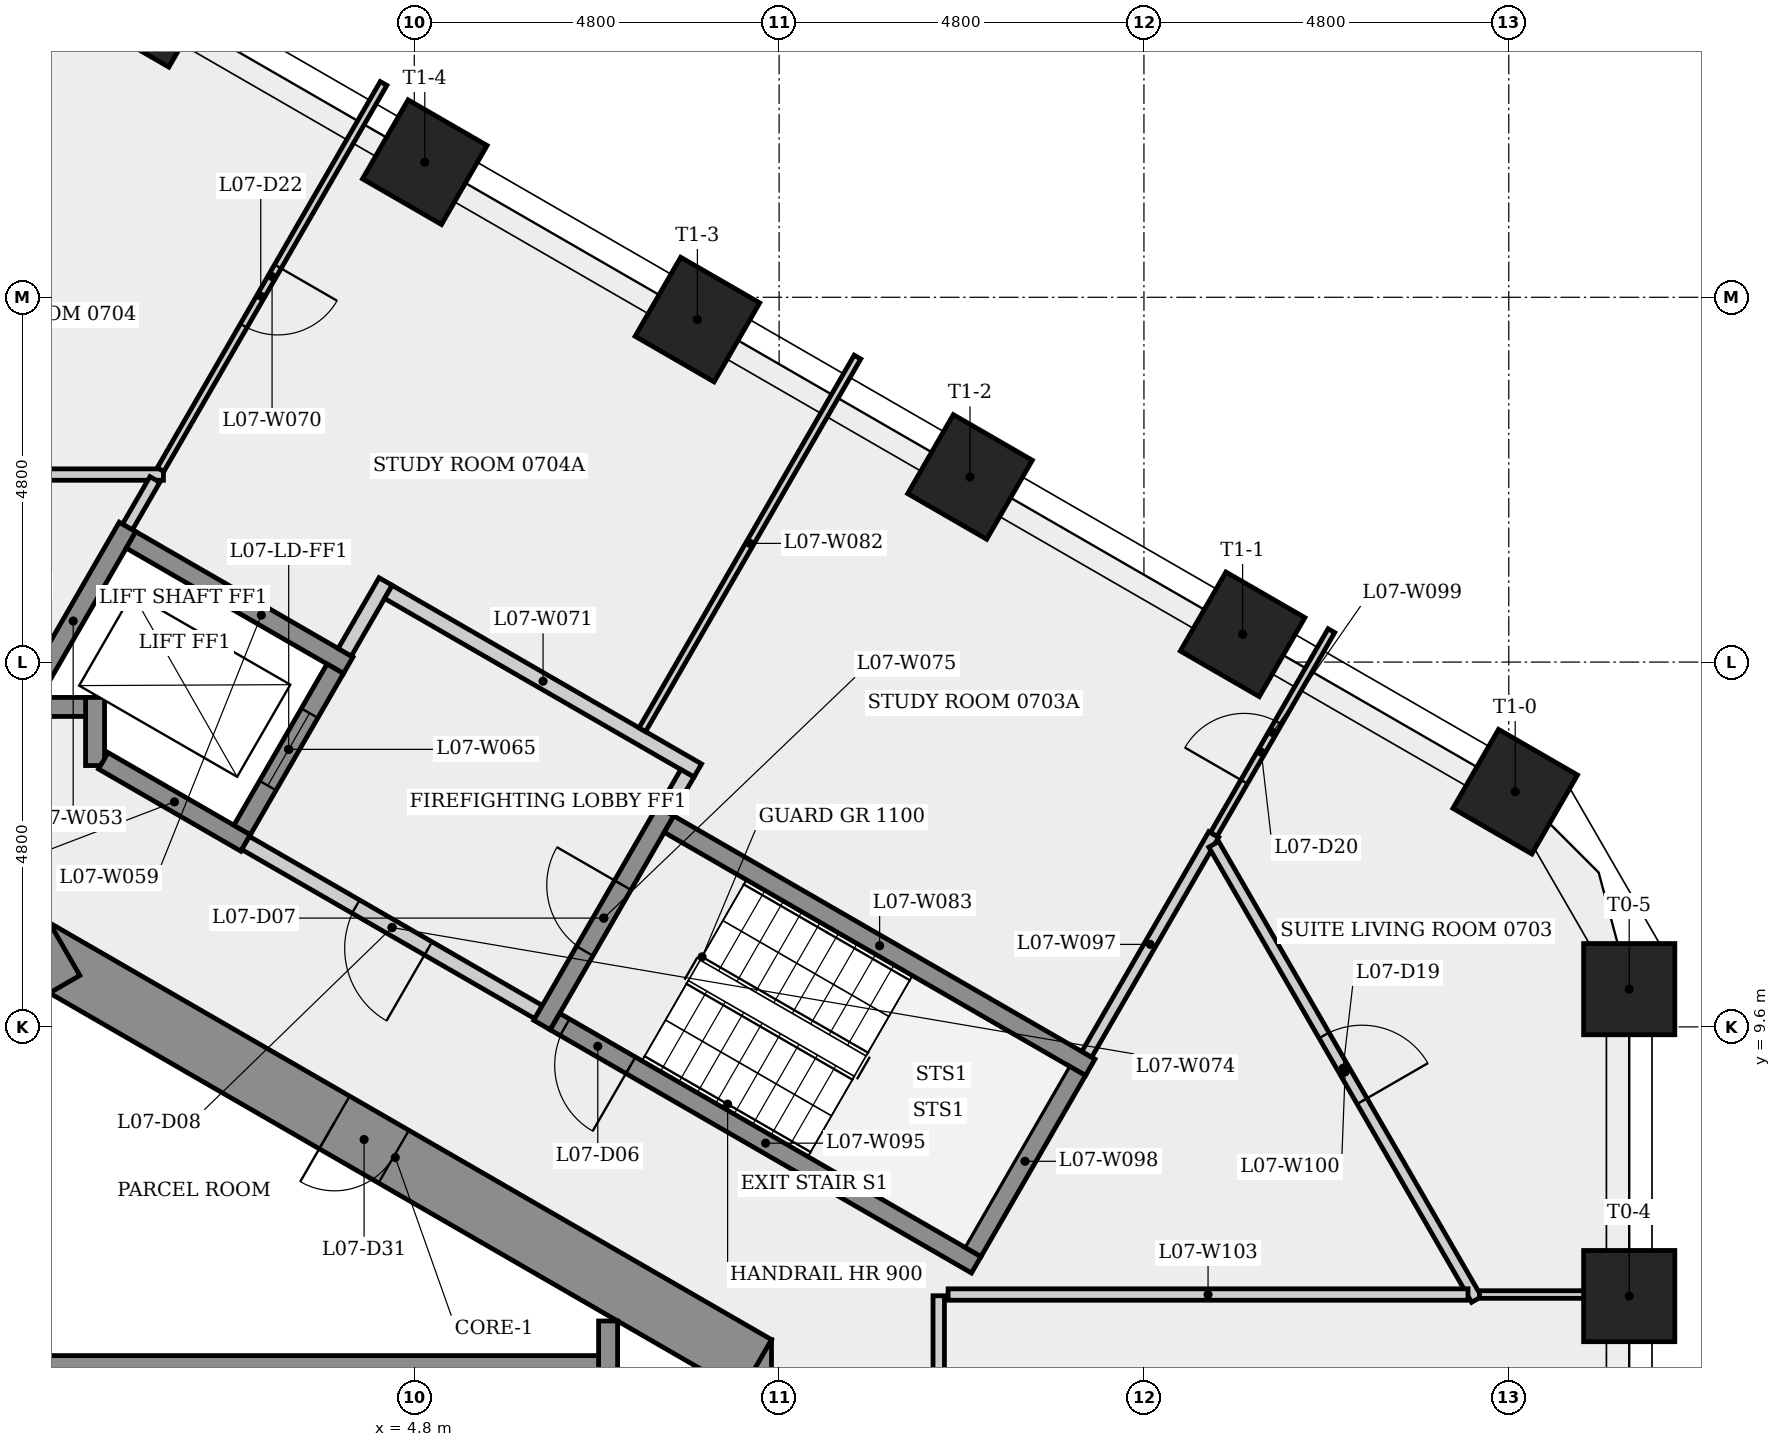
"""IFC4 building model, lengths in metres.
Left out: names, types, materials, properties, quantities, classifications, styles, units other than length and angle.
Written with IfcOpenShell. Run it as: python <this file> out.ifc"""

import sys

from ifc_helpers import new_model, si_unit, direction, frame, frame_2d, origin, origin_2d, place, context, subcontext, project, spatial, rectangle, extrude, element, fill, save


model = new_model("IFC4")
c1 = context("Model", 3, precision=1e-05, world=origin(), true_north=direction((0.0, 1.0)))
c2 = subcontext(c1, "Body", "Model", "MODEL_VIEW")
j1 = project(units=[si_unit("LENGTHUNIT", "METRE"), si_unit("PLANEANGLEUNIT", "RADIAN")], contexts=[c1])
p1 = place(None, origin())
s1 = spatial("IfcSite", under=j1, at=p1, CompositionType="ELEMENT")
p2 = place(p1, origin())
s2 = spatial("IfcBuilding", under=s1, at=p2, CompositionType="ELEMENT")
p3 = place(p2, frame((0.0, 0.0, 32.3)))
s3 = spatial("IfcBuildingStorey", under=s2, at=p3, CompositionType="ELEMENT", Elevation=32.3)
p4 = place(p3, frame((9.1, -5.485, 0.0), z_axis=(0.0, 0.0, 1.0), x_axis=(0.0, 1.0, 0.0)))
e1 = element("IfcWall", 1, at=p4, inside=s3, PredefinedType="SHEAR", context=c2, shape_type="SweptSolid", body=[
    extrude(rectangle(XDim=10.97, YDim=0.8, at=frame_2d((5.485, 0.0))), origin(), (0.0, 0.0, 1.0), 3.4),
])
p5 = place(p4, frame((4.685, 0.0, 0.0)))
e2 = element("IfcOpeningElement", 2, at=p5, cuts=e1, PredefinedType="OPENING", context=c2, shape_type="SweptSolid", body=[
    extrude(rectangle(XDim=1.6, YDim=2.1, at=frame_2d((0.8, 1.05))), frame((0.0, 0.41, 0.0), z_axis=(0.0, -1.0, 0.0), x_axis=(1.0, 0.0, 0.0)), (0.0, 0.0, 1.0), 0.82),
])
p6 = place(p3, frame((9.3, 5.138, 0.0), z_axis=(0.0, 0.0, 1.0), x_axis=(-0.866023993627, 0.500002442456, 0.0)))
e3 = element("IfcWall", 3, at=p6, inside=s3, PredefinedType="SHEAR", context=c2, shape_type="SweptSolid", body=[
    extrude(rectangle(XDim=10.97, YDim=0.8, at=frame_2d((5.485, 0.0))), origin(), (0.0, 0.0, 1.0), 3.4),
])
p7 = place(p6, frame((5.509, 0.0, 0.0)))
e4 = element("IfcOpeningElement", 4, at=p7, cuts=e3, PredefinedType="OPENING", context=c2, shape_type="SweptSolid", body=[
    extrude(rectangle(XDim=0.9, YDim=2.1, at=frame_2d((0.45, 1.05))), frame((0.0, 0.41, 0.0), z_axis=(0.0, -1.0, 0.0), x_axis=(1.0, 0.0, 0.0)), (0.0, 0.0, 1.0), 0.82),
])
p8 = place(p3, frame((0.2, 10.623, 0.0), z_axis=(0.0, 0.0, 1.0), x_axis=(-0.866023993627, -0.500002442456, 0.0)))
e5 = element("IfcWall", 5, at=p8, inside=s3, PredefinedType="SHEAR", context=c2, shape_type="SweptSolid", body=[
    extrude(rectangle(XDim=10.97, YDim=0.8, at=frame_2d((5.485, 0.0))), origin(), (0.0, 0.0, 1.0), 3.4),
])
p9 = place(p8, frame((6.993, 0.0, 0.0)))
e6 = element("IfcOpeningElement", 6, at=p9, cuts=e5, PredefinedType="OPENING", context=c2, shape_type="SweptSolid", body=[
    extrude(rectangle(XDim=0.9, YDim=2.1, at=frame_2d((0.45, 1.05))), frame((0.0, 0.41, 0.0), z_axis=(0.0, -1.0, 0.0), x_axis=(1.0, 0.0, 0.0)), (0.0, 0.0, 1.0), 0.82),
])
for number, where, z_axis, x_axis in (
    (7, (20.785, 6.058, 0.0), (0.0, 0.0, 1.0), (1.0, 0.0, 0.0)),
    (8, (20.785, 10.097, 0.0), (0.0, 0.0, 1.0), (1.0, 0.0, 0.0)),
    (9, (19.285, 12.695, 0.0), (0.0, 0.0, 1.0), (0.5, 0.866, 0.0)),
    (10, (15.698, 14.765, 0.0), (0.0, 0.0, 1.0), (0.5, 0.866, 0.0)),
    (11, (12.111, 16.836, 0.0), (0.0, 0.0, 1.0), (0.5, 0.866, 0.0)),
    (12, (8.525, 18.907, 0.0), (0.0, 0.0, 1.0), (0.5, 0.866, 0.0)),
    (13, (4.938, 20.978, 0.0), (0.0, 0.0, 1.0), (0.5, 0.866, 0.0)),
    (14, (1.352, 23.048, 0.0), (0.0, 0.0, 1.0), (0.5, 0.866, 0.0)),
):
    element("IfcColumn", number, at=place(p3, frame(where, z_axis=z_axis, x_axis=x_axis)), inside=s3, PredefinedType="COLUMN", context=c2, shape_type="SweptSolid", body=[
        extrude(rectangle(XDim=1.2, YDim=1.2, at=origin_2d()), origin(), (0.0, 0.0, 1.0), 3.4),
    ])
p10 = place(p3, frame((-7.225, 5.15, 0.0), z_axis=(0.0, 0.0, 1.0), x_axis=(1.0, 0.0, 0.0)))
e15 = element("IfcWall", 15, at=p10, inside=s3, PredefinedType="SHEAR", context=c2, shape_type="SweptSolid", body=[
    extrude(rectangle(XDim=14.7, YDim=0.25, at=frame_2d((7.35, 0.0))), origin(), (0.0, 0.0, 1.0), 3.05),
])
p11 = place(p3, frame((-2.794, 16.867, 0.0), z_axis=(0.0, 0.0, 1.0), x_axis=(1.0, 0.0, 0.0)))
e16 = element("IfcWall", 16, at=p11, inside=s3, PredefinedType="PARTITIONING", context=c2, shape_type="SweptSolid", body=[
    extrude(rectangle(XDim=4.294, YDim=0.15, at=frame_2d((2.147, 0.0))), origin(), (0.0, 0.0, 1.0), 3.05),
])
p12 = place(p11, frame((1.647, 0.0, 0.0)))
e17 = element("IfcOpeningElement", 17, at=p12, cuts=e16, PredefinedType="OPENING", context=c2, shape_type="SweptSolid", body=[
    extrude(rectangle(XDim=1.0, YDim=2.1, at=frame_2d((0.5, 1.05))), frame((0.0, 0.085, 0.0), z_axis=(0.0, -1.0, 0.0), x_axis=(1.0, 0.0, 0.0)), (0.0, 0.0, 1.0), 0.17),
])
p13 = place(p3, frame((-0.403, 13.702, 0.0), z_axis=(0.0, 0.0, 1.0), x_axis=(0.499976111731, 0.866039195244, 0.0)))
e18 = element("IfcWall", 18, at=p13, inside=s3, PredefinedType="SHEAR", context=c2, shape_type="SweptSolid", body=[
    extrude(rectangle(XDim=2.861, YDim=0.25, at=frame_2d((1.43, 0.0))), origin(), (0.0, 0.0, 1.0), 3.05),
])
p14 = place(p3, frame((0.6, 13.039, 0.0), z_axis=(0.0, 0.0, 1.0), x_axis=(0.0, 1.0, 0.0)))
e19 = element("IfcWall", 19, at=p14, inside=s3, PredefinedType="SHEAR", context=c2, shape_type="SweptSolid", body=[
    extrude(rectangle(XDim=0.896, YDim=0.25, at=frame_2d((0.448, 0.0))), origin(), (0.0, 0.0, 1.0), 3.05),
])
p15 = place(p3, frame((0.475, 13.81, 0.0), z_axis=(0.0, 0.0, 1.0), x_axis=(-1.0, 0.0, 0.0)))
e20 = element("IfcWall", 20, at=p15, inside=s3, PredefinedType="SHEAR", context=c2, shape_type="SweptSolid", body=[
    extrude(rectangle(XDim=0.691, YDim=0.25, at=frame_2d((0.345, 0.0))), origin(), (0.0, 0.0, 1.0), 3.4),
])
p16 = place(p3, frame((1.073, 16.008, 0.0), z_axis=(0.0, 0.0, 1.0), x_axis=(0.866040211805, -0.499974350878, 0.0)))
e21 = element("IfcWall", 21, at=p16, inside=s3, PredefinedType="SHEAR", context=c2, shape_type="SweptSolid", body=[
    extrude(rectangle(XDim=3.3, YDim=0.25, at=frame_2d((1.65, 0.0))), origin(), (0.0, 0.0, 1.0), 3.05),
])
p17 = place(p3, frame((1.387, 16.802, 0.0), z_axis=(0.0, 0.0, 1.0), x_axis=(-0.499859449273, -0.866106535579, 0.0)))
e22 = element("IfcWall", 22, at=p17, inside=s3, PredefinedType="PARTITIONING", context=c2, shape_type="SweptSolid", body=[
    extrude(rectangle(XDim=0.72, YDim=0.15, at=frame_2d((0.36, 0.0))), origin(), (0.0, 0.0, 1.0), 3.05),
])
p18 = place(p3, frame((2.581, 12.02, 0.0), z_axis=(0.0, 0.0, 1.0), x_axis=(-0.86603892542, 0.499976579108, 0.0)))
e23 = element("IfcWall", 23, at=p18, inside=s3, PredefinedType="SHEAR", context=c2, shape_type="SweptSolid", body=[
    extrude(rectangle(XDim=2.162, YDim=0.25, at=frame_2d((1.081, 0.0))), origin(), (0.0, 0.0, 1.0), 3.05),
])
p19 = place(p3, frame((2.535, 12.191, 0.0), z_axis=(0.0, 0.0, 1.0), x_axis=(0.500061746146, 0.865989751695, 0.0)))
e24 = element("IfcWall", 24, at=p19, inside=s3, PredefinedType="SHEAR", context=c2, shape_type="SweptSolid", body=[
    extrude(rectangle(XDim=2.45, YDim=0.25, at=frame_2d((1.225, 0.0))), origin(), (0.0, 0.0, 1.0), 3.4),
])
p20 = place(p19, frame((0.675, 0.0, 0.0)))
e25 = element("IfcOpeningElement", 25, at=p20, cuts=e24, PredefinedType="OPENING", context=c2, shape_type="SweptSolid", body=[
    extrude(rectangle(XDim=1.1, YDim=2.1, at=frame_2d((0.55, 1.05))), frame((0.0, 0.135, 0.0), z_axis=(0.0, -1.0, 0.0), x_axis=(1.0, 0.0, 0.0)), (0.0, 0.0, 1.0), 0.27),
])
p21 = place(p3, frame((3.885, 14.529, 0.0), z_axis=(0.0, 0.0, 1.0), x_axis=(0.499997628298, 0.866026773083, 0.0)))
e26 = element("IfcWall", 26, at=p21, inside=s3, PredefinedType="PARTITIONING", context=c2, shape_type="SweptSolid", body=[
    extrude(rectangle(XDim=1.075, YDim=0.2, at=frame_2d((0.538, 0.0))), origin(), (0.0, 0.0, 1.0), 3.05),
])
p22 = place(p3, frame((4.396, 22.013, 0.0), z_axis=(0.0, 0.0, 1.0), x_axis=(-0.500005810984, -0.866022048785, 0.0)))
e27 = element("IfcWall", 27, at=p22, inside=s3, PredefinedType="PARTITIONING", context=c2, shape_type="SweptSolid", body=[
    extrude(rectangle(XDim=5.867, YDim=0.1, at=frame_2d((2.934, 0.0))), origin(), (0.0, 0.0, 1.0), 3.05),
])
p23 = place(p22, frame((2.781, 0.0, 0.0)))
e28 = element("IfcOpeningElement", 28, at=p23, cuts=e27, PredefinedType="OPENING", context=c2, shape_type="SweptSolid", body=[
    extrude(rectangle(XDim=0.9, YDim=2.1, at=frame_2d((0.45, 1.05))), frame((0.0, 0.06, 0.0), z_axis=(0.0, -1.0, 0.0), x_axis=(1.0, 0.0, 0.0)), (0.0, 0.0, 1.0), 0.12),
])
p24 = place(p3, frame((4.459, 15.323, 0.0), z_axis=(0.0, 0.0, 1.0), x_axis=(0.866016039709, -0.500016218704, 0.0)))
e29 = element("IfcWall", 29, at=p24, inside=s3, PredefinedType="PARTITIONING", context=c2, shape_type="SweptSolid", body=[
    extrude(rectangle(XDim=4.7, YDim=0.2, at=frame_2d((2.35, 0.0))), origin(), (0.0, 0.0, 1.0), 3.05),
])
p25 = place(p3, frame((6.435, 9.795, 0.0), z_axis=(0.0, 0.0, 1.0), x_axis=(-0.866012907634, 0.500021643343, 0.0)))
e30 = element("IfcWall", 30, at=p25, inside=s3, PredefinedType="PARTITIONING", context=c2, shape_type="SweptSolid", body=[
    extrude(rectangle(XDim=4.45, YDim=0.2, at=frame_2d((2.225, 0.0))), origin(), (0.0, 0.0, 1.0), 3.05),
])
p26 = place(p25, frame((1.675, 0.0, 0.0)))
e31 = element("IfcOpeningElement", 31, at=p26, cuts=e30, PredefinedType="OPENING", context=c2, shape_type="SweptSolid", body=[
    extrude(rectangle(XDim=1.1, YDim=2.1, at=frame_2d((0.55, 1.05))), frame((0.0, 0.11, 0.0), z_axis=(0.0, -1.0, 0.0), x_axis=(1.0, 0.0, 0.0)), (0.0, 0.0, 1.0), 0.22),
])
p27 = place(p3, frame((6.48, 9.624, 0.0), z_axis=(0.0, 0.0, 1.0), x_axis=(0.500017246033, 0.866015446554, 0.0)))
e32 = element("IfcWall", 32, at=p27, inside=s3, PredefinedType="SHEAR", context=c2, shape_type="SweptSolid", body=[
    extrude(rectangle(XDim=3.25, YDim=0.25, at=frame_2d((1.625, 0.0))), origin(), (0.0, 0.0, 1.0), 3.05),
])
p28 = place(p27, frame((1.125, 0.0, 0.0)))
e33 = element("IfcOpeningElement", 33, at=p28, cuts=e32, PredefinedType="OPENING", context=c2, shape_type="SweptSolid", body=[
    extrude(rectangle(XDim=1.0, YDim=2.1, at=frame_2d((0.5, 1.05))), frame((0.0, 0.135, 0.0), z_axis=(0.0, -1.0, 0.0), x_axis=(1.0, 0.0, 0.0)), (0.0, 0.0, 1.0), 0.27),
])
p29 = place(p3, frame((7.35, 5.73, 0.0), z_axis=(0.0, 0.0, 1.0), x_axis=(0.0, -1.0, 0.0)))
e34 = element("IfcWall", 34, at=p29, inside=s3, PredefinedType="SHEAR", context=c2, shape_type="SweptSolid", body=[
    extrude(rectangle(XDim=3.805, YDim=0.25, at=frame_2d((1.903, 0.0))), origin(), (0.0, 0.0, 1.0), 3.05),
])
p30 = place(p3, frame((7.8, 13.51, 0.0), z_axis=(0.0, 0.0, 1.0), x_axis=(0.500016079044, 0.866016120345, 0.0)))
e35 = element("IfcWall", 35, at=p30, inside=s3, PredefinedType="PARTITIONING", context=c2, shape_type="SweptSolid", body=[
    extrude(rectangle(XDim=5.662, YDim=0.1, at=frame_2d((2.831, 0.0))), origin(), (0.0, 0.0, 1.0), 3.05),
])
p31 = place(p3, frame((8.151, 12.268, 0.0), z_axis=(0.0, 0.0, 1.0), x_axis=(0.866025499775, -0.499999833739, 0.0)))
e36 = element("IfcWall", 36, at=p31, inside=s3, PredefinedType="SHEAR", context=c2, shape_type="SweptSolid", body=[
    extrude(rectangle(XDim=6.4, YDim=0.25, at=frame_2d((3.2, 0.0))), origin(), (0.0, 0.0, 1.0), 3.05),
])
p32 = place(p3, frame((8.393, 12.937, 0.0), z_axis=(0.0, 0.0, 1.0), x_axis=(-0.500065409566, -0.86598763626, 0.0)))
e37 = element("IfcWall", 37, at=p32, inside=s3, PredefinedType="PARTITIONING", context=c2, shape_type="SweptSolid", body=[
    extrude(rectangle(XDim=0.575, YDim=0.2, at=frame_2d((0.288, 0.0))), origin(), (0.0, 0.0, 1.0), 3.05),
])
p33 = place(p3, frame((11.7, -6.062, 0.0), z_axis=(0.0, 0.0, 1.0), x_axis=(0.0, 1.0, 0.0)))
e38 = element("IfcWall", 38, at=p33, inside=s3, PredefinedType="PARTITIONING", context=c2, shape_type="SweptSolid", body=[
    extrude(rectangle(XDim=12.125, YDim=0.15, at=frame_2d((6.062, 0.0))), origin(), (0.0, 0.0, 1.0), 3.05),
])
p34 = place(p33, frame((7.595, 0.0, 0.0)))
e39 = element("IfcOpeningElement", 39, at=p34, cuts=e38, PredefinedType="OPENING", context=c2, shape_type="SweptSolid", body=[
    extrude(rectangle(XDim=1.0, YDim=2.1, at=frame_2d((0.5, 1.05))), frame((0.0, 0.085, 0.0), z_axis=(0.0, -1.0, 0.0), x_axis=(1.0, 0.0, 0.0)), (0.0, 0.0, 1.0), 0.17),
])
p35 = place(p3, frame((12.194, 6.47, 0.0), z_axis=(0.0, 0.0, 1.0), x_axis=(-0.866025499775, 0.499999833739, 0.0)))
e40 = element("IfcWall", 40, at=p35, inside=s3, PredefinedType="SHEAR", context=c2, shape_type="SweptSolid", body=[
    extrude(rectangle(XDim=6.4, YDim=0.25, at=frame_2d((3.2, 0.0))), origin(), (0.0, 0.0, 1.0), 3.05),
])
p36 = place(p35, frame((5.25, 0.0, 0.0)))
e41 = element("IfcOpeningElement", 41, at=p36, cuts=e40, PredefinedType="OPENING", context=c2, shape_type="SweptSolid", body=[
    extrude(rectangle(XDim=1.0, YDim=2.1, at=frame_2d((0.5, 1.05))), frame((0.0, 0.135, 0.0), z_axis=(0.0, -1.0, 0.0), x_axis=(1.0, 0.0, 0.0)), (0.0, 0.0, 1.0), 0.27),
])
p37 = place(p3, frame((13.648, 9.239, 0.0), z_axis=(0.0, 0.0, 1.0), x_axis=(0.500013405032, 0.866017664247, 0.0)))
e42 = element("IfcWall", 42, at=p37, inside=s3, PredefinedType="PARTITIONING", context=c2, shape_type="SweptSolid", body=[
    extrude(rectangle(XDim=3.341, YDim=0.15, at=frame_2d((1.671, 0.0))), origin(), (0.0, 0.0, 1.0), 3.05),
])
p38 = place(p3, frame((13.523, 9.022, 0.0), z_axis=(0.0, 0.0, 1.0), x_axis=(-0.500034990121, -0.866005201286, 0.0)))
e43 = element("IfcWall", 43, at=p38, inside=s3, PredefinedType="SHEAR", context=c2, shape_type="SweptSolid", body=[
    extrude(rectangle(XDim=2.75, YDim=0.25, at=frame_2d((1.375, 0.0))), origin(), (0.0, 0.0, 1.0), 3.05),
])
p39 = place(p3, frame((15.318, 12.132, 0.0), z_axis=(0.0, 0.0, 1.0), x_axis=(0.49997275422, 0.866041133571, 0.0)))
e44 = element("IfcWall", 44, at=p39, inside=s3, PredefinedType="PARTITIONING", context=c2, shape_type="SweptSolid", body=[
    extrude(rectangle(XDim=3.096, YDim=0.1, at=frame_2d((1.548, 0.0))), origin(), (0.0, 0.0, 1.0), 3.05),
])
p40 = place(p39, frame((0.8, 0.0, 0.0)))
e45 = element("IfcOpeningElement", 45, at=p40, cuts=e44, PredefinedType="OPENING", context=c2, shape_type="SweptSolid", body=[
    extrude(rectangle(XDim=0.9, YDim=2.1, at=frame_2d((0.45, 1.05))), frame((0.0, 0.06, 0.0), z_axis=(0.0, -1.0, 0.0), x_axis=(1.0, 0.0, 0.0)), (0.0, 0.0, 1.0), 0.12),
])
p41 = place(p3, frame((15.318, 12.002, 0.0), z_axis=(0.0, 0.0, 1.0), x_axis=(0.500015831195, -0.866016263447, 0.0)))
e46 = element("IfcWall", 46, at=p41, inside=s3, PredefinedType="PARTITIONING", context=c2, shape_type="SweptSolid", body=[
    extrude(rectangle(XDim=6.915, YDim=0.15, at=frame_2d((3.458, 0.0))), origin(), (0.0, 0.0, 1.0), 3.05),
])
p42 = place(p41, frame((2.903, 0.0, 0.0)))
e47 = element("IfcOpeningElement", 47, at=p42, cuts=e46, PredefinedType="OPENING", context=c2, shape_type="SweptSolid", body=[
    extrude(rectangle(XDim=1.0, YDim=2.1, at=frame_2d((0.5, 1.05))), frame((0.0, 0.085, 0.0), z_axis=(0.0, -1.0, 0.0), x_axis=(1.0, 0.0, 0.0)), (0.0, 0.0, 1.0), 0.17),
])
p43 = place(p3, frame((18.813, 6.079, 0.0), z_axis=(0.0, 0.0, 1.0), x_axis=(1.0, 0.0, 0.0)))
e48 = element("IfcWall", 48, at=p43, inside=s3, PredefinedType="PARTITIONING", context=c2, shape_type="SweptSolid", body=[
    extrude(rectangle(XDim=1.971, YDim=0.1, at=frame_2d((0.986, 0.0))), origin(), (0.0, 0.0, 1.0), 3.05),
])
p44 = place(p3, frame((18.664, 6.079, 0.0), z_axis=(0.0, 0.0, 1.0), x_axis=(-1.0, 0.0, 0.0)))
e49 = element("IfcWall", 49, at=p44, inside=s3, PredefinedType="PARTITIONING", context=c2, shape_type="SweptSolid", body=[
    extrude(rectangle(XDim=6.84, YDim=0.15, at=frame_2d((3.42, 0.0))), origin(), (0.0, 0.0, 1.0), 3.05),
])
p45 = place(p36, origin())
e50 = element("IfcDoor", 50, at=p45, inside=s3, OperationType="SINGLE_SWING_LEFT", PredefinedType="DOOR", context=c2, shape_type="SweptSolid", body=[
    extrude(rectangle(XDim=1.0, YDim=2.1, at=frame_2d((0.5, 1.05))), frame((0.0, 0.025, 0.0), z_axis=(0.0, -1.0, 0.0), x_axis=(1.0, 0.0, 0.0)), (0.0, 0.0, 1.0), 0.05),
])
fill(e41, e50)
p46 = place(p28, origin())
e51 = element("IfcDoor", 51, at=p46, inside=s3, OperationType="SINGLE_SWING_RIGHT", PredefinedType="DOOR", context=c2, shape_type="SweptSolid", body=[
    extrude(rectangle(XDim=1.0, YDim=2.1, at=frame_2d((0.5, 1.05))), frame((0.0, 0.025, 0.0), z_axis=(0.0, -1.0, 0.0), x_axis=(1.0, 0.0, 0.0)), (0.0, 0.0, 1.0), 0.05),
])
fill(e33, e51)
p47 = place(p26, origin())
e52 = element("IfcDoor", 52, at=p47, inside=s3, OperationType="SINGLE_SWING_LEFT", PredefinedType="DOOR", context=c2, shape_type="SweptSolid", body=[
    extrude(rectangle(XDim=1.1, YDim=2.1, at=frame_2d((0.55, 1.05))), frame((0.0, 0.025, 0.0), z_axis=(0.0, -1.0, 0.0), x_axis=(1.0, 0.0, 0.0)), (0.0, 0.0, 1.0), 0.05),
])
fill(e31, e52)
p48 = place(p20, origin())
e53 = element("IfcDoor", 53, at=p48, inside=s3, OperationType="SLIDING_TO_LEFT", PredefinedType="DOOR", context=c2, shape_type="SweptSolid", body=[
    extrude(rectangle(XDim=1.1, YDim=2.1, at=frame_2d((0.55, 1.05))), frame((0.0, 0.025, 0.0), z_axis=(0.0, -1.0, 0.0), x_axis=(1.0, 0.0, 0.0)), (0.0, 0.0, 1.0), 0.05),
])
fill(e25, e53)
p49 = place(p42, origin())
e54 = element("IfcDoor", 54, at=p49, inside=s3, OperationType="SINGLE_SWING_RIGHT", PredefinedType="DOOR", context=c2, shape_type="SweptSolid", body=[
    extrude(rectangle(XDim=1.0, YDim=2.1, at=frame_2d((0.5, 1.05))), frame((0.0, 0.025, 0.0), z_axis=(0.0, -1.0, 0.0), x_axis=(1.0, 0.0, 0.0)), (0.0, 0.0, 1.0), 0.05),
])
fill(e47, e54)
p50 = place(p40, origin())
e55 = element("IfcDoor", 55, at=p50, inside=s3, OperationType="SINGLE_SWING_LEFT", PredefinedType="DOOR", context=c2, shape_type="SweptSolid", body=[
    extrude(rectangle(XDim=0.9, YDim=2.1, at=frame_2d((0.45, 1.05))), frame((0.0, 0.025, 0.0), z_axis=(0.0, -1.0, 0.0), x_axis=(1.0, 0.0, 0.0)), (0.0, 0.0, 1.0), 0.05),
])
fill(e45, e55)
p51 = place(p23, origin())
e56 = element("IfcDoor", 56, at=p51, inside=s3, OperationType="SINGLE_SWING_LEFT", PredefinedType="DOOR", context=c2, shape_type="SweptSolid", body=[
    extrude(rectangle(XDim=0.9, YDim=2.1, at=frame_2d((0.45, 1.05))), frame((0.0, 0.025, 0.0), z_axis=(0.0, -1.0, 0.0), x_axis=(1.0, 0.0, 0.0)), (0.0, 0.0, 1.0), 0.05),
])
fill(e28, e56)
p52 = place(p7, origin())
e57 = element("IfcDoor", 57, at=p52, inside=s3, OperationType="SINGLE_SWING_RIGHT", PredefinedType="DOOR", context=c2, shape_type="SweptSolid", body=[
    extrude(rectangle(XDim=0.9, YDim=2.1, at=frame_2d((0.45, 1.05))), frame((0.0, 0.025, 0.0), z_axis=(0.0, -1.0, 0.0), x_axis=(1.0, 0.0, 0.0)), (0.0, 0.0, 1.0), 0.05),
])
fill(e4, e57)
save(model, sys.argv[1])
